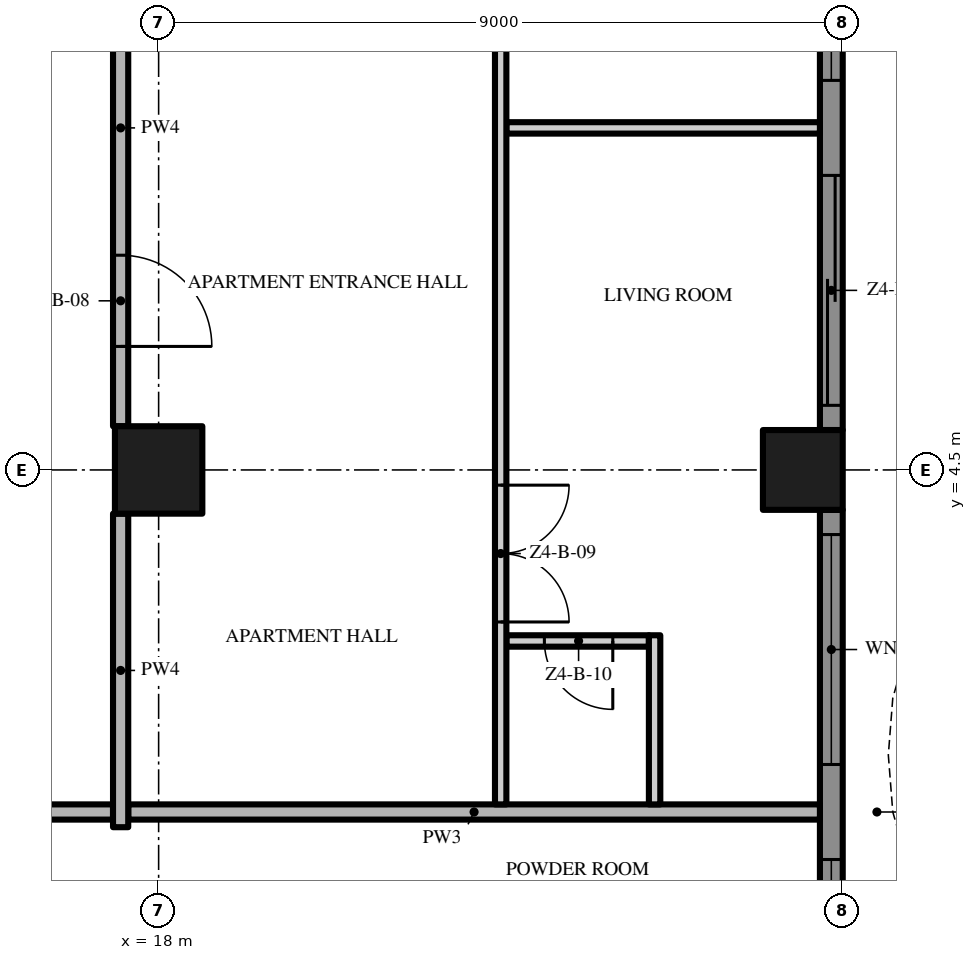
"""IFC4 building model, lengths in metres.
Left out: names, types, materials, properties, quantities, classifications, styles, units other than length and angle.
Written with IfcOpenShell. Run it as: python <this file> out.ifc"""

import sys

from ifc_helpers import new_model, si_unit, direction, frame, frame_2d, origin, origin_2d, place, context, subcontext, project, spatial, polyline, rectangle, outline, extrude, element, fill, save


model = new_model("IFC4")
c1 = context("Model", 3, precision=1e-05, world=origin(), true_north=direction((0.0, 1.0)))
c2 = subcontext(c1, "Body", "Model", "MODEL_VIEW")
j1 = project(units=[si_unit("LENGTHUNIT", "METRE"), si_unit("PLANEANGLEUNIT", "RADIAN")], contexts=[c1])
p1 = place(None, origin())
s1 = spatial("IfcSite", under=j1, at=p1, CompositionType="ELEMENT")
p2 = place(p1, origin())
s2 = spatial("IfcBuilding", under=s1, at=p2, CompositionType="ELEMENT")
p3 = place(p2, frame((0.0, 0.0, 195.8)))
s3 = spatial("IfcBuildingStorey", under=s2, at=p3, CompositionType="ELEMENT", Elevation=195.8)
p4 = place(p3, frame((18.0, 4.5, 0.0), z_axis=(0.0, 0.0, 1.0), x_axis=(1.0, 0.0, 0.0)))
e1 = element("IfcColumn", 1, at=p4, inside=s3, PredefinedType="COLUMN", context=c2, shape_type="SweptSolid", body=[
    extrude(rectangle(XDim=1.15, YDim=1.15, at=origin_2d()), origin(), (0.0, 0.0, 1.0), 3.5),
])
p5 = place(p3, frame((26.475, 4.5, 0.0), z_axis=(0.0, 0.0, 1.0), x_axis=(1.0, 0.0, 0.0)))
e2 = element("IfcColumn", 2, at=p5, inside=s3, PredefinedType="COLUMN", context=c2, shape_type="SweptSolid", body=[
    extrude(rectangle(XDim=1.05, YDim=1.05, at=origin_2d()), origin(), (0.0, 0.0, 1.0), 3.5),
])
p6 = place(p3, frame((26.85, 3.975, 0.0), z_axis=(0.0, 0.0, 1.0), x_axis=(0.0, -1.0, 0.0)))
e3 = element("IfcWall", 3, at=p6, inside=s3, PredefinedType="SOLIDWALL", context=c2, shape_type="SweptSolid", body=[
    extrude(rectangle(XDim=7.95, YDim=0.3, at=frame_2d((3.975, 0.0))), origin(), (0.0, 0.0, 1.0), 3.5),
])
p7 = place(p6, frame((4.6, 0.0, 0.45)))
e4 = element("IfcOpeningElement", 4, at=p7, cuts=e3, PredefinedType="OPENING", context=c2, shape_type="SweptSolid", body=[
    extrude(rectangle(XDim=3.025, YDim=2.65, at=frame_2d((1.512, 1.325))), frame((0.0, 0.16, 0.0), z_axis=(0.0, -1.0, 0.0), x_axis=(1.0, 0.0, 0.0)), (0.0, 0.0, 1.0), 0.32),
])
p8 = place(p6, frame((0.325, 0.0, 0.45)))
e5 = element("IfcOpeningElement", 5, at=p8, cuts=e3, PredefinedType="OPENING", context=c2, shape_type="SweptSolid", body=[
    extrude(rectangle(XDim=3.025, YDim=2.65, at=frame_2d((1.512, 1.325))), frame((0.0, 0.16, 0.0), z_axis=(0.0, -1.0, 0.0), x_axis=(1.0, 0.0, 0.0)), (0.0, 0.0, 1.0), 0.32),
])
p9 = place(p3, frame((26.85, 12.975, 0.0), z_axis=(0.0, 0.0, 1.0), x_axis=(0.0, -1.0, 0.0)))
e6 = element("IfcWall", 6, at=p9, inside=s3, PredefinedType="SOLIDWALL", context=c2, shape_type="SweptSolid", body=[
    extrude(rectangle(XDim=7.95, YDim=0.3, at=frame_2d((3.975, 0.0))), origin(), (0.0, 0.0, 1.0), 3.5),
])
p10 = place(p9, frame((4.6, 0.0, 0.0)))
e7 = element("IfcOpeningElement", 7, at=p10, cuts=e6, PredefinedType="OPENING", context=c2, shape_type="SweptSolid", body=[
    extrude(rectangle(XDim=3.025, YDim=2.4, at=frame_2d((1.512, 1.2))), frame((0.0, 0.16, 0.0), z_axis=(0.0, -1.0, 0.0), x_axis=(1.0, 0.0, 0.0)), (0.0, 0.0, 1.0), 0.32),
])
p11 = place(p9, frame((0.325, 0.0, 0.45)))
e8 = element("IfcOpeningElement", 8, at=p11, cuts=e6, PredefinedType="OPENING", context=c2, shape_type="SweptSolid", body=[
    extrude(rectangle(XDim=3.025, YDim=2.65, at=frame_2d((1.512, 1.325))), frame((0.0, 0.16, 0.0), z_axis=(0.0, -1.0, 0.0), x_axis=(1.0, 0.0, 0.0)), (0.0, 0.0, 1.0), 0.32),
])
p12 = place(p3, origin())
e9 = element("IfcWall", 9, at=p12, inside=s3, PredefinedType="USERDEFINED", context=c2, shape_type="SweptSolid", body=[
    extrude(outline(polyline([(28.8, -18.0), (28.095, -16.5), (27.659, -15.0), (27.6, -14.25), (27.659, -13.5), (28.095, -12.0), (28.8, -10.5), (29.505, -9.0), (29.941, -7.5), (30.0, -6.75), (29.941, -6.0), (29.505, -4.5), (28.8, -3.0), (28.095, -1.5), (27.659, 0.0), (27.6, 0.75), (27.659, 1.5), (28.095, 3.0), (28.8, 4.5), (29.505, 6.0), (29.941, 7.5), (30.0, 8.25), (29.941, 9.0), (29.505, 10.5), (28.8, 12.0), (28.095, 13.5), (27.659, 15.0), (27.6, 15.75), (27.659, 16.5), (28.095, 18.0), (27.855, 18.07), (27.411, 16.545), (27.349, 15.75), (27.411, 14.955), (27.86, 13.411), (28.574, 11.894), (29.271, 10.411), (29.694, 8.955), (29.749, 8.25), (29.694, 7.545), (29.271, 6.089), (28.574, 4.606), (27.86, 3.089), (27.411, 1.545), (27.349, 0.75), (27.411, -0.045), (27.86, -1.589), (28.574, -3.106), (29.271, -4.589), (29.694, -6.045), (29.749, -6.75), (29.694, -7.455), (29.271, -8.911), (28.574, -10.394), (27.86, -11.911), (27.411, -13.455), (27.349, -14.25), (27.411, -15.045), (27.86, -16.589), (28.574, -18.106), (28.8, -18.0)])), origin(), (0.0, 0.0, 1.0), 0.9),
])
p13 = place(p3, frame((17.4, 0.0, 0.0), z_axis=(0.0, 0.0, 1.0), x_axis=(-1.0, 0.0, 0.0)))
e10 = element("IfcWall", 10, at=p13, inside=s3, PredefinedType="PARTITIONING", context=c2, shape_type="SweptSolid", body=[
    extrude(rectangle(XDim=17.3, YDim=0.2, at=frame_2d((8.65, 0.0))), origin(), (0.0, 0.0, 1.0), 3.5),
])
p14 = place(p13, frame((7.65, 0.0, 0.0)))
e11 = element("IfcOpeningElement", 11, at=p14, cuts=e10, PredefinedType="OPENING", context=c2, shape_type="SweptSolid", body=[
    extrude(rectangle(XDim=1.5, YDim=2.4, at=frame_2d((0.75, 1.2))), frame((0.0, 0.11, 0.0), z_axis=(0.0, -1.0, 0.0), x_axis=(1.0, 0.0, 0.0)), (0.0, 0.0, 1.0), 0.22),
])
p15 = place(p3, frame((17.6, 0.0, 0.0), z_axis=(0.0, 0.0, 1.0), x_axis=(1.0, 0.0, 0.0)))
e12 = element("IfcWall", 12, at=p15, inside=s3, PredefinedType="PARTITIONING", context=c2, shape_type="SweptSolid", body=[
    extrude(rectangle(XDim=9.1, YDim=0.2, at=frame_2d((4.55, 0.0))), origin(), (0.0, 0.0, 1.0), 3.5),
])
p16 = place(p3, frame((24.45, 2.25, 0.0), z_axis=(0.0, 0.0, 1.0), x_axis=(-1.0, 0.0, 0.0)))
e13 = element("IfcWall", 13, at=p16, inside=s3, PredefinedType="PARTITIONING", context=c2, shape_type="SweptSolid", body=[
    extrude(rectangle(XDim=1.875, YDim=0.15, at=frame_2d((0.938, 0.0))), origin(), (0.0, 0.0, 1.0), 3.5),
])
p17 = place(p16, frame((0.475, 0.0, 0.0)))
e14 = element("IfcOpeningElement", 14, at=p17, cuts=e13, PredefinedType="OPENING", context=c2, shape_type="SweptSolid", body=[
    extrude(rectangle(XDim=0.9, YDim=2.1, at=frame_2d((0.45, 1.05))), frame((0.0, 0.085, 0.0), z_axis=(0.0, -1.0, 0.0), x_axis=(1.0, 0.0, 0.0)), (0.0, 0.0, 1.0), 0.17),
])
p18 = place(p3, frame((22.575, 9.0, 0.0), z_axis=(0.0, 0.0, 1.0), x_axis=(1.0, 0.0, 0.0)))
e15 = element("IfcWall", 15, at=p18, inside=s3, PredefinedType="PARTITIONING", context=c2, shape_type="SweptSolid", body=[
    extrude(rectangle(XDim=4.125, YDim=0.15, at=frame_2d((2.062, 0.0))), origin(), (0.0, 0.0, 1.0), 3.5),
])
p19 = place(p3, frame((17.5, -0.2, 0.0), z_axis=(0.0, 0.0, 1.0), x_axis=(0.0, 1.0, 0.0)))
e16 = element("IfcWall", 16, at=p19, inside=s3, PredefinedType="PARTITIONING", context=c2, shape_type="SweptSolid", body=[
    extrude(rectangle(XDim=4.125, YDim=0.2, at=frame_2d((2.062, 0.0))), origin(), (0.0, 0.0, 1.0), 3.5),
])
p20 = place(p3, frame((17.5, 12.925, 0.0), z_axis=(0.0, 0.0, 1.0), x_axis=(0.0, -1.0, 0.0)))
e17 = element("IfcWall", 17, at=p20, inside=s3, PredefinedType="PARTITIONING", context=c2, shape_type="SweptSolid", body=[
    extrude(rectangle(XDim=7.85, YDim=0.2, at=frame_2d((3.925, 0.0))), origin(), (0.0, 0.0, 1.0), 3.5),
])
p21 = place(p20, frame((5.6, 0.0, 0.0)))
e18 = element("IfcOpeningElement", 18, at=p21, cuts=e17, PredefinedType="OPENING", context=c2, shape_type="SweptSolid", body=[
    extrude(rectangle(XDim=1.2, YDim=2.4, at=frame_2d((0.6, 1.2))), frame((0.0, 0.11, 0.0), z_axis=(0.0, -1.0, 0.0), x_axis=(1.0, 0.0, 0.0)), (0.0, 0.0, 1.0), 0.22),
])
p22 = place(p3, frame((22.5, 17.475, 0.0), z_axis=(0.0, 0.0, 1.0), x_axis=(0.0, -1.0, 0.0)))
e19 = element("IfcWall", 19, at=p22, inside=s3, PredefinedType="PARTITIONING", context=c2, shape_type="SweptSolid", body=[
    extrude(rectangle(XDim=17.375, YDim=0.15, at=frame_2d((8.688, 0.0))), origin(), (0.0, 0.0, 1.0), 3.5),
])
p23 = place(p22, frame((13.175, 0.0, 0.0)))
e20 = element("IfcOpeningElement", 20, at=p23, cuts=e19, PredefinedType="OPENING", context=c2, shape_type="SweptSolid", body=[
    extrude(rectangle(XDim=1.8, YDim=2.4, at=frame_2d((0.9, 1.2))), frame((0.0, 0.085, 0.0), z_axis=(0.0, -1.0, 0.0), x_axis=(1.0, 0.0, 0.0)), (0.0, 0.0, 1.0), 0.17),
])
p24 = place(p22, frame((5.725, 0.0, 0.0)))
e21 = element("IfcOpeningElement", 21, at=p24, cuts=e19, PredefinedType="OPENING", context=c2, shape_type="SweptSolid", body=[
    extrude(rectangle(XDim=1.0, YDim=2.4, at=frame_2d((0.5, 1.2))), frame((0.0, 0.085, 0.0), z_axis=(0.0, -1.0, 0.0), x_axis=(1.0, 0.0, 0.0)), (0.0, 0.0, 1.0), 0.17),
])
p25 = place(p3, frame((24.525, 0.1, 0.0), z_axis=(0.0, 0.0, 1.0), x_axis=(0.0, 1.0, 0.0)))
e22 = element("IfcWall", 22, at=p25, inside=s3, PredefinedType="PARTITIONING", context=c2, shape_type="SweptSolid", body=[
    extrude(rectangle(XDim=2.225, YDim=0.15, at=frame_2d((1.113, 0.0))), origin(), (0.0, 0.0, 1.0), 3.5),
])
p26 = place(p7, origin())
e23 = element("IfcWindow", 23, at=p26, inside=s3, PartitioningType="SINGLE_PANEL", PredefinedType="WINDOW", context=c2, shape_type="SweptSolid", body=[
    extrude(rectangle(XDim=3.025, YDim=2.65, at=frame_2d((1.512, 1.325))), frame((0.0, 0.03, 0.0), z_axis=(0.0, -1.0, 0.0), x_axis=(1.0, 0.0, 0.0)), (0.0, 0.0, 1.0), 0.06),
])
fill(e4, e23)
p27 = place(p8, origin())
e24 = element("IfcWindow", 24, at=p27, inside=s3, PartitioningType="SINGLE_PANEL", PredefinedType="WINDOW", context=c2, shape_type="SweptSolid", body=[
    extrude(rectangle(XDim=3.025, YDim=2.65, at=frame_2d((1.512, 1.325))), frame((0.0, 0.03, 0.0), z_axis=(0.0, -1.0, 0.0), x_axis=(1.0, 0.0, 0.0)), (0.0, 0.0, 1.0), 0.06),
])
fill(e5, e24)
p28 = place(p10, origin())
e25 = element("IfcDoor", 25, at=p28, inside=s3, OperationType="SINGLE_SWING_LEFT", PredefinedType="DOOR", context=c2, shape_type="SweptSolid", body=[
    extrude(rectangle(XDim=3.025, YDim=2.4, at=frame_2d((1.512, 1.2))), frame((0.0, 0.025, 0.0), z_axis=(0.0, -1.0, 0.0), x_axis=(1.0, 0.0, 0.0)), (0.0, 0.0, 1.0), 0.05),
])
fill(e7, e25)
p29 = place(p11, origin())
e26 = element("IfcWindow", 26, at=p29, inside=s3, PartitioningType="SINGLE_PANEL", PredefinedType="WINDOW", context=c2, shape_type="SweptSolid", body=[
    extrude(rectangle(XDim=3.025, YDim=2.65, at=frame_2d((1.512, 1.325))), frame((0.0, 0.03, 0.0), z_axis=(0.0, -1.0, 0.0), x_axis=(1.0, 0.0, 0.0)), (0.0, 0.0, 1.0), 0.06),
])
fill(e8, e26)
p30 = place(p21, origin())
e27 = element("IfcDoor", 27, at=p30, inside=s3, OperationType="SINGLE_SWING_RIGHT", PredefinedType="DOOR", context=c2, shape_type="SweptSolid", body=[
    extrude(rectangle(XDim=1.2, YDim=2.4, at=frame_2d((0.6, 1.2))), frame((0.0, 0.025, 0.0), z_axis=(0.0, -1.0, 0.0), x_axis=(1.0, 0.0, 0.0)), (0.0, 0.0, 1.0), 0.05),
])
fill(e18, e27)
p31 = place(p23, origin())
e28 = element("IfcDoor", 28, at=p31, inside=s3, OperationType="DOUBLE_DOOR_SINGLE_SWING", PredefinedType="DOOR", context=c2, shape_type="SweptSolid", body=[
    extrude(rectangle(XDim=1.8, YDim=2.4, at=frame_2d((0.9, 1.2))), frame((0.0, 0.025, 0.0), z_axis=(0.0, -1.0, 0.0), x_axis=(1.0, 0.0, 0.0)), (0.0, 0.0, 1.0), 0.05),
])
fill(e20, e28)
p32 = place(p17, origin())
e29 = element("IfcDoor", 29, at=p32, inside=s3, OperationType="SINGLE_SWING_LEFT", PredefinedType="DOOR", context=c2, shape_type="SweptSolid", body=[
    extrude(rectangle(XDim=0.9, YDim=2.1, at=frame_2d((0.45, 1.05))), frame((0.0, 0.025, 0.0), z_axis=(0.0, -1.0, 0.0), x_axis=(1.0, 0.0, 0.0)), (0.0, 0.0, 1.0), 0.05),
])
fill(e14, e29)
save(model, sys.argv[1])
